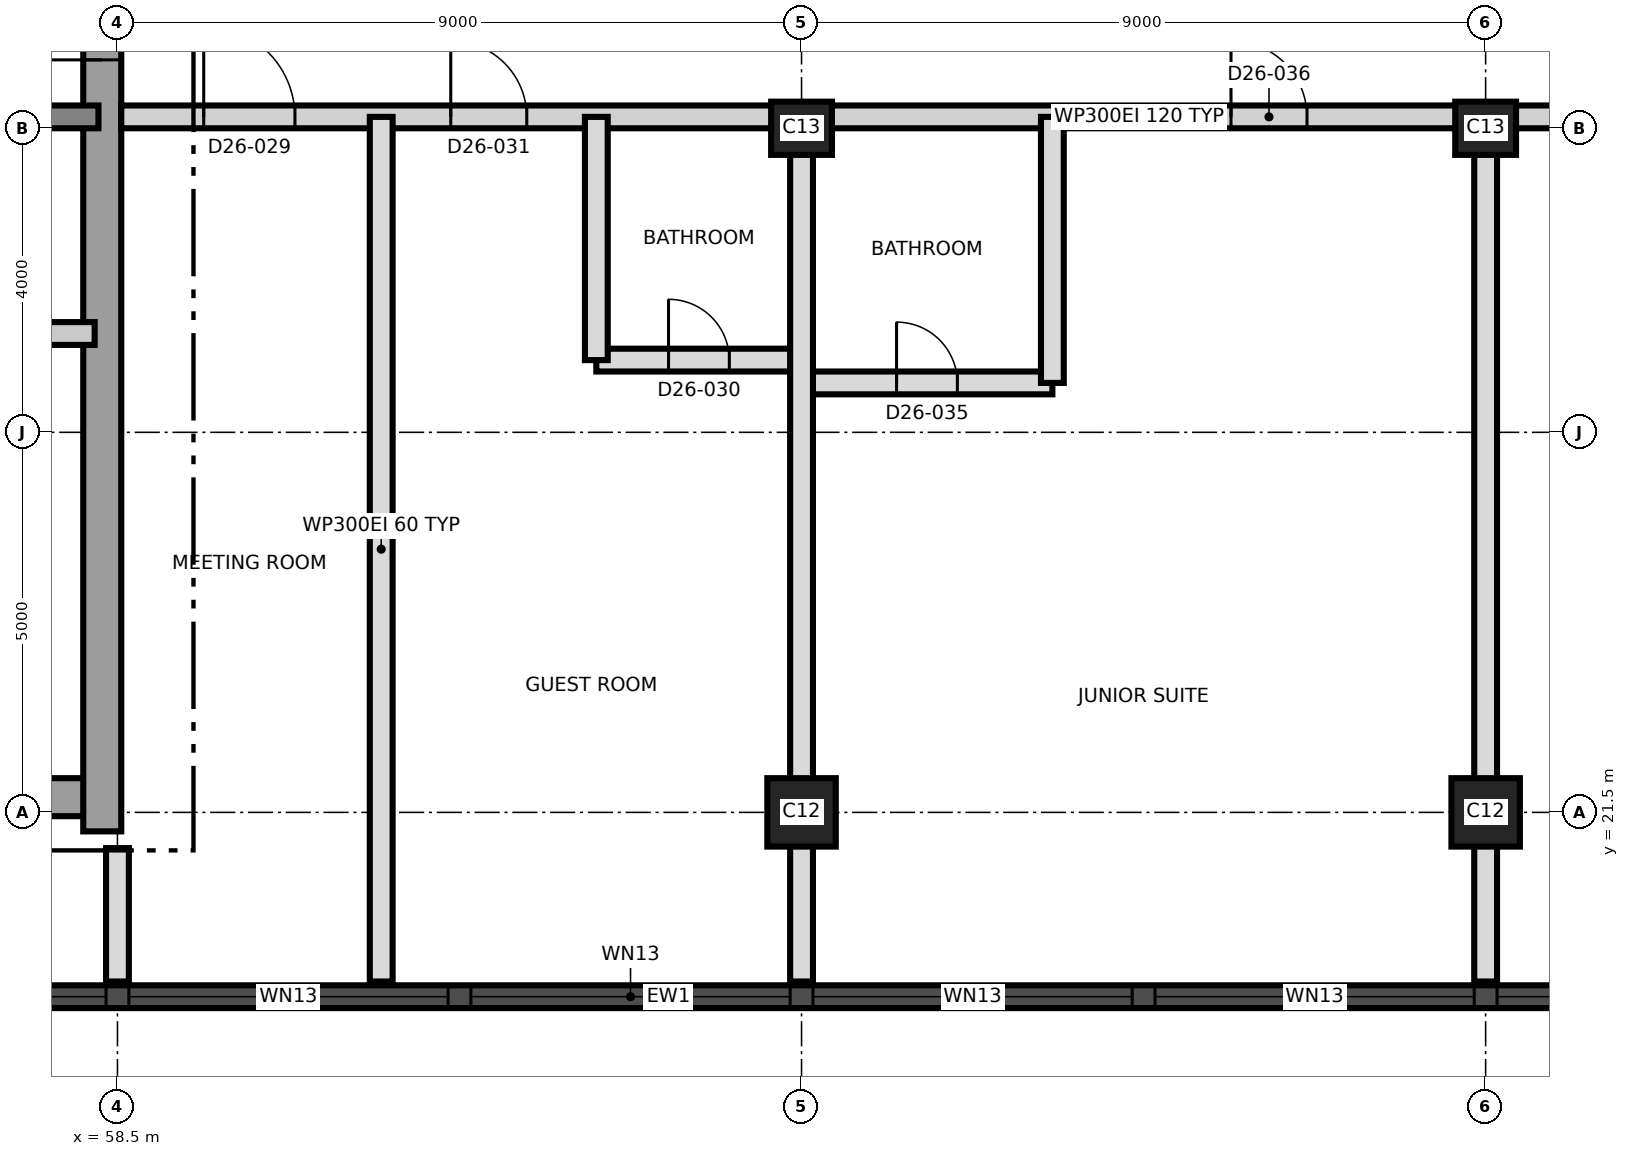
"""IFC4 building model, lengths in metres.
Left out: names, types, materials, properties, quantities, classifications, styles, units other than length and angle.
Written with IfcOpenShell. Run it as: python <this file> out.ifc"""

import sys

from ifc_helpers import new_model, si_unit, direction, frame, frame_2d, origin, origin_2d, place, context, subcontext, project, spatial, rectangle, extrude, element, fill, save


model = new_model("IFC4")
c1 = context("Model", 3, precision=1e-05, world=origin(), true_north=direction((0.0, 1.0)))
c2 = subcontext(c1, "Body", "Model", "MODEL_VIEW")
j1 = project(units=[si_unit("LENGTHUNIT", "METRE"), si_unit("PLANEANGLEUNIT", "RADIAN")], contexts=[c1])
p1 = place(None, origin())
s1 = spatial("IfcSite", under=j1, at=p1, CompositionType="ELEMENT")
p2 = place(p1, origin())
s2 = spatial("IfcBuilding", under=s1, at=p2, CompositionType="ELEMENT")
p3 = place(p2, frame((0.0, 0.0, 240.2)))
s3 = spatial("IfcBuildingStorey", under=s2, at=p3, CompositionType="ELEMENT", Elevation=240.2)
p4 = place(p3, frame((31.25, 21.7, 0.0), z_axis=(0.0, 0.0, 1.0), x_axis=(1.0, 0.0, 0.0)))
e1 = element("IfcWall", 1, at=p4, inside=s3, PredefinedType="SHEAR", context=c2, shape_type="SweptSolid", body=[
    extrude(rectangle(XDim=27.0, YDim=0.5, at=frame_2d((13.5, 0.0))), origin(), (0.0, 0.0, 1.0), 3.7),
])
p5 = place(p3, frame((58.3, 21.25, 0.0), z_axis=(0.0, 0.0, 1.0), x_axis=(0.0, 1.0, 0.0)))
e2 = element("IfcWall", 2, at=p5, inside=s3, PredefinedType="SHEAR", context=c2, shape_type="SweptSolid", body=[
    extrude(rectangle(XDim=18.5, YDim=0.5, at=frame_2d((9.25, 0.0))), origin(), (0.0, 0.0, 1.0), 3.7),
])
p6 = place(p5, frame((10.15, 0.0, 0.0)))
e3 = element("IfcOpeningElement", 3, at=p6, cuts=e2, PredefinedType="OPENING", context=c2, shape_type="SweptSolid", body=[
    extrude(rectangle(XDim=1.2, YDim=2.1, at=frame_2d((0.6, 1.05))), frame((0.0, 0.26, 0.0), z_axis=(0.0, -1.0, 0.0), x_axis=(1.0, 0.0, 0.0)), (0.0, 0.0, 1.0), 0.52),
])
p7 = place(p3, frame((31.75, 30.65, 0.0), z_axis=(0.0, 0.0, 1.0), x_axis=(1.0, 0.0, 0.0)))
e4 = element("IfcWall", 4, at=p7, inside=s3, PredefinedType="SHEAR", context=c2, shape_type="SweptSolid", body=[
    extrude(rectangle(XDim=26.5, YDim=0.3, at=frame_2d((13.25, 0.0))), origin(), (0.0, 0.0, 1.0), 3.7),
])
p8 = place(p7, frame((24.75, 0.0, 0.0)))
e5 = element("IfcOpeningElement", 5, at=p8, cuts=e4, PredefinedType="OPENING", context=c2, shape_type="SweptSolid", body=[
    extrude(rectangle(XDim=1.0, YDim=2.1, at=frame_2d((0.5, 1.05))), frame((0.0, 0.16, 0.0), z_axis=(0.0, -1.0, 0.0), x_axis=(1.0, 0.0, 0.0)), (0.0, 0.0, 1.0), 0.32),
])
for number, where, z_axis, x_axis in (
    (6, (67.5, 21.5, 0.0), (0.0, 0.0, 1.0), (1.0, 0.0, 0.0)),
    (7, (76.5, 21.5, 0.0), (0.0, 0.0, 1.0), (1.0, 0.0, 0.0)),
):
    element("IfcColumn", number, at=place(p3, frame(where, z_axis=z_axis, x_axis=x_axis)), inside=s3, PredefinedType="COLUMN", context=c2, shape_type="SweptSolid", body=[
        extrude(rectangle(XDim=0.9, YDim=0.9, at=origin_2d()), origin(), (0.0, 0.0, 1.0), 3.7),
    ])
for number, where, z_axis, x_axis in (
    (8, (67.5, 30.5, 0.0), (0.0, 0.0, 1.0), (1.0, 0.0, 0.0)),
    (9, (76.5, 30.5, 0.0), (0.0, 0.0, 1.0), (1.0, 0.0, 0.0)),
):
    element("IfcColumn", number, at=place(p3, frame(where, z_axis=z_axis, x_axis=x_axis)), inside=s3, PredefinedType="COLUMN", context=c2, shape_type="SweptSolid", body=[
        extrude(rectangle(XDim=0.8, YDim=0.7, at=origin_2d()), origin(), (0.0, 0.0, 1.0), 3.7),
    ])
p9 = place(p3, frame((44.01, 19.075, 0.0), z_axis=(0.0, 0.0, 1.0), x_axis=(1.0, 0.0, 0.0)))
e10 = element("IfcWall", 10, at=p9, inside=s3, PredefinedType="SOLIDWALL", context=c2, shape_type="SweptSolid", body=[
    extrude(rectangle(XDim=43.478, YDim=0.3, at=frame_2d((21.739, 0.0))), origin(), (0.0, 0.0, 1.0), 3.4),
])
p10 = place(p9, frame((1.845, 0.0, 0.3)))
e11 = element("IfcOpeningElement", 11, at=p10, cuts=e10, PredefinedType="OPENING", context=c2, shape_type="SweptSolid", body=[
    extrude(rectangle(XDim=1.8, YDim=2.4, at=frame_2d((0.9, 1.2))), frame((0.0, 0.16, 0.0), z_axis=(0.0, -1.0, 0.0), x_axis=(1.0, 0.0, 0.0)), (0.0, 0.0, 1.0), 0.32),
])
p11 = place(p9, frame((5.64, 0.0, 0.9)))
e12 = element("IfcOpeningElement", 12, at=p11, cuts=e10, PredefinedType="OPENING", context=c2, shape_type="SweptSolid", body=[
    extrude(rectangle(XDim=4.2, YDim=1.7, at=frame_2d((2.1, 0.85))), frame((0.0, 0.16, 0.0), z_axis=(0.0, -1.0, 0.0), x_axis=(1.0, 0.0, 0.0)), (0.0, 0.0, 1.0), 0.32),
])
p12 = place(p9, frame((10.14, 0.0, 0.9)))
e13 = element("IfcOpeningElement", 13, at=p12, cuts=e10, PredefinedType="OPENING", context=c2, shape_type="SweptSolid", body=[
    extrude(rectangle(XDim=4.2, YDim=1.7, at=frame_2d((2.1, 0.85))), frame((0.0, 0.16, 0.0), z_axis=(0.0, -1.0, 0.0), x_axis=(1.0, 0.0, 0.0)), (0.0, 0.0, 1.0), 0.32),
])
p13 = place(p9, frame((14.64, 0.0, 0.9)))
e14 = element("IfcOpeningElement", 14, at=p13, cuts=e10, PredefinedType="OPENING", context=c2, shape_type="SweptSolid", body=[
    extrude(rectangle(XDim=4.2, YDim=1.7, at=frame_2d((2.1, 0.85))), frame((0.0, 0.16, 0.0), z_axis=(0.0, -1.0, 0.0), x_axis=(1.0, 0.0, 0.0)), (0.0, 0.0, 1.0), 0.32),
])
p14 = place(p9, frame((19.14, 0.0, 0.9)))
e15 = element("IfcOpeningElement", 15, at=p14, cuts=e10, PredefinedType="OPENING", context=c2, shape_type="SweptSolid", body=[
    extrude(rectangle(XDim=4.2, YDim=1.7, at=frame_2d((2.1, 0.85))), frame((0.0, 0.16, 0.0), z_axis=(0.0, -1.0, 0.0), x_axis=(1.0, 0.0, 0.0)), (0.0, 0.0, 1.0), 0.32),
])
p15 = place(p9, frame((23.64, 0.0, 0.9)))
e16 = element("IfcOpeningElement", 16, at=p15, cuts=e10, PredefinedType="OPENING", context=c2, shape_type="SweptSolid", body=[
    extrude(rectangle(XDim=4.2, YDim=1.7, at=frame_2d((2.1, 0.85))), frame((0.0, 0.16, 0.0), z_axis=(0.0, -1.0, 0.0), x_axis=(1.0, 0.0, 0.0)), (0.0, 0.0, 1.0), 0.32),
])
p16 = place(p9, frame((28.14, 0.0, 0.9)))
e17 = element("IfcOpeningElement", 17, at=p16, cuts=e10, PredefinedType="OPENING", context=c2, shape_type="SweptSolid", body=[
    extrude(rectangle(XDim=4.2, YDim=1.7, at=frame_2d((2.1, 0.85))), frame((0.0, 0.16, 0.0), z_axis=(0.0, -1.0, 0.0), x_axis=(1.0, 0.0, 0.0)), (0.0, 0.0, 1.0), 0.32),
])
p17 = place(p9, frame((32.64, 0.0, 0.9)))
e18 = element("IfcOpeningElement", 18, at=p17, cuts=e10, PredefinedType="OPENING", context=c2, shape_type="SweptSolid", body=[
    extrude(rectangle(XDim=4.2, YDim=1.7, at=frame_2d((2.1, 0.85))), frame((0.0, 0.16, 0.0), z_axis=(0.0, -1.0, 0.0), x_axis=(1.0, 0.0, 0.0)), (0.0, 0.0, 1.0), 0.32),
])
p18 = place(p9, frame((37.14, 0.0, 0.9)))
e19 = element("IfcOpeningElement", 19, at=p18, cuts=e10, PredefinedType="OPENING", context=c2, shape_type="SweptSolid", body=[
    extrude(rectangle(XDim=4.2, YDim=1.7, at=frame_2d((2.1, 0.85))), frame((0.0, 0.16, 0.0), z_axis=(0.0, -1.0, 0.0), x_axis=(1.0, 0.0, 0.0)), (0.0, 0.0, 1.0), 0.32),
])
p19 = place(p3, frame((55.8, 27.8, 0.0), z_axis=(0.0, 0.0, 1.0), x_axis=(1.0, 0.0, 0.0)))
e20 = element("IfcWall", 20, at=p19, inside=s3, PredefinedType="PARTITIONING", context=c2, shape_type="SweptSolid", body=[
    extrude(rectangle(XDim=2.4, YDim=0.3, at=frame_2d((1.2, 0.0))), origin(), (0.0, 0.0, 1.0), 3.4),
])
p20 = place(p19, frame((0.75, 0.0, 0.0)))
e21 = element("IfcOpeningElement", 21, at=p20, cuts=e20, PredefinedType="OPENING", context=c2, shape_type="SweptSolid", body=[
    extrude(rectangle(XDim=0.9, YDim=2.1, at=frame_2d((0.45, 1.05))), frame((0.0, 0.16, 0.0), z_axis=(0.0, -1.0, 0.0), x_axis=(1.0, 0.0, 0.0)), (0.0, 0.0, 1.0), 0.32),
])
p21 = place(p3, frame((67.5, 27.15, 0.0), z_axis=(0.0, 0.0, 1.0), x_axis=(1.0, 0.0, 0.0)))
e22 = element("IfcWall", 22, at=p21, inside=s3, PredefinedType="PARTITIONING", context=c2, shape_type="SweptSolid", body=[
    extrude(rectangle(XDim=3.3, YDim=0.3, at=frame_2d((1.65, 0.0))), origin(), (0.0, 0.0, 1.0), 3.4),
])
p22 = place(p21, frame((1.25, 0.0, 0.0)))
e23 = element("IfcOpeningElement", 23, at=p22, cuts=e22, PredefinedType="OPENING", context=c2, shape_type="SweptSolid", body=[
    extrude(rectangle(XDim=0.8, YDim=2.1, at=frame_2d((0.4, 1.05))), frame((0.0, 0.16, 0.0), z_axis=(0.0, -1.0, 0.0), x_axis=(1.0, 0.0, 0.0)), (0.0, 0.0, 1.0), 0.32),
])
p23 = place(p3, frame((64.8, 27.45, 0.0), z_axis=(0.0, 0.0, 1.0), x_axis=(1.0, 0.0, 0.0)))
e24 = element("IfcWall", 24, at=p23, inside=s3, PredefinedType="PARTITIONING", context=c2, shape_type="SweptSolid", body=[
    extrude(rectangle(XDim=2.7, YDim=0.3, at=frame_2d((1.35, 0.0))), origin(), (0.0, 0.0, 1.0), 3.4),
])
p24 = place(p23, frame((0.95, 0.0, 0.0)))
e25 = element("IfcOpeningElement", 25, at=p24, cuts=e24, PredefinedType="OPENING", context=c2, shape_type="SweptSolid", body=[
    extrude(rectangle(XDim=0.8, YDim=2.1, at=frame_2d((0.4, 1.05))), frame((0.0, 0.16, 0.0), z_axis=(0.0, -1.0, 0.0), x_axis=(1.0, 0.0, 0.0)), (0.0, 0.0, 1.0), 0.32),
])
p25 = place(p3, frame((58.55, 30.65, 0.0), z_axis=(0.0, 0.0, 1.0), x_axis=(1.0, 0.0, 0.0)))
e26 = element("IfcWall", 26, at=p25, inside=s3, PredefinedType="PARTITIONING", context=c2, shape_type="SweptSolid", body=[
    extrude(rectangle(XDim=26.78, YDim=0.3, at=frame_2d((13.39, 0.0))), origin(), (0.0, 0.0, 1.0), 3.4),
])
p26 = place(p25, frame((1.085, 0.0, 0.0)))
e27 = element("IfcOpeningElement", 27, at=p26, cuts=e26, PredefinedType="OPENING", context=c2, shape_type="SweptSolid", body=[
    extrude(rectangle(XDim=1.2, YDim=2.1, at=frame_2d((0.6, 1.05))), frame((0.0, 0.16, 0.0), z_axis=(0.0, -1.0, 0.0), x_axis=(1.0, 0.0, 0.0)), (0.0, 0.0, 1.0), 0.32),
])
p27 = place(p25, frame((4.335, 0.0, 0.0)))
e28 = element("IfcOpeningElement", 28, at=p27, cuts=e26, PredefinedType="OPENING", context=c2, shape_type="SweptSolid", body=[
    extrude(rectangle(XDim=1.0, YDim=2.1, at=frame_2d((0.5, 1.05))), frame((0.0, 0.16, 0.0), z_axis=(0.0, -1.0, 0.0), x_axis=(1.0, 0.0, 0.0)), (0.0, 0.0, 1.0), 0.32),
])
p28 = place(p25, frame((14.6, 0.0, 0.0)))
e29 = element("IfcOpeningElement", 29, at=p28, cuts=e26, PredefinedType="OPENING", context=c2, shape_type="SweptSolid", body=[
    extrude(rectangle(XDim=1.0, YDim=2.4, at=frame_2d((0.5, 1.2))), frame((0.0, 0.16, 0.0), z_axis=(0.0, -1.0, 0.0), x_axis=(1.0, 0.0, 0.0)), (0.0, 0.0, 1.0), 0.32),
])
p29 = place(p25, frame((20.3, 0.0, 0.0)))
e30 = element("IfcOpeningElement", 30, at=p29, cuts=e26, PredefinedType="OPENING", context=c2, shape_type="SweptSolid", body=[
    extrude(rectangle(XDim=1.0, YDim=2.4, at=frame_2d((0.5, 1.2))), frame((0.0, 0.16, 0.0), z_axis=(0.0, -1.0, 0.0), x_axis=(1.0, 0.0, 0.0)), (0.0, 0.0, 1.0), 0.32),
])
p30 = place(p3, frame((58.5, 19.275, 0.0), z_axis=(0.0, 0.0, 1.0), x_axis=(0.0, 1.0, 0.0)))
e31 = element("IfcWall", 31, at=p30, inside=s3, PredefinedType="PARTITIONING", context=c2, shape_type="SweptSolid", body=[
    extrude(rectangle(XDim=1.755, YDim=0.3, at=frame_2d((0.877, 0.0))), origin(), (0.0, 0.0, 1.0), 3.35),
])
p31 = place(p3, frame((61.97, 19.275, 0.0), z_axis=(0.0, 0.0, 1.0), x_axis=(0.0, 1.0, 0.0)))
e32 = element("IfcWall", 32, at=p31, inside=s3, PredefinedType="PARTITIONING", context=c2, shape_type="SweptSolid", body=[
    extrude(rectangle(XDim=11.375, YDim=0.3, at=frame_2d((5.688, 0.0))), origin(), (0.0, 0.0, 1.0), 3.35),
])
p32 = place(p3, frame((64.8, 27.45, 0.0), z_axis=(0.0, 0.0, 1.0), x_axis=(0.0, 1.0, 0.0)))
e33 = element("IfcWall", 33, at=p32, inside=s3, PredefinedType="PARTITIONING", context=c2, shape_type="SweptSolid", body=[
    extrude(rectangle(XDim=3.2, YDim=0.3, at=frame_2d((1.6, 0.0))), origin(), (0.0, 0.0, 1.0), 3.4),
])
p33 = place(p3, frame((67.5, 19.275, 0.0), z_axis=(0.0, 0.0, 1.0), x_axis=(0.0, 1.0, 0.0)))
e34 = element("IfcWall", 34, at=p33, inside=s3, PredefinedType="PARTITIONING", context=c2, shape_type="SweptSolid", body=[
    extrude(rectangle(XDim=11.375, YDim=0.3, at=frame_2d((5.688, 0.0))), origin(), (0.0, 0.0, 1.0), 3.35),
])
p34 = place(p3, frame((70.8, 27.15, 0.0), z_axis=(0.0, 0.0, 1.0), x_axis=(0.0, 1.0, 0.0)))
e35 = element("IfcWall", 35, at=p34, inside=s3, PredefinedType="PARTITIONING", context=c2, shape_type="SweptSolid", body=[
    extrude(rectangle(XDim=3.5, YDim=0.3, at=frame_2d((1.75, 0.0))), origin(), (0.0, 0.0, 1.0), 3.4),
])
p35 = place(p3, frame((76.5, 19.275, 0.0), z_axis=(0.0, 0.0, 1.0), x_axis=(0.0, 1.0, 0.0)))
e36 = element("IfcWall", 36, at=p35, inside=s3, PredefinedType="PARTITIONING", context=c2, shape_type="SweptSolid", body=[
    extrude(rectangle(XDim=11.375, YDim=0.3, at=frame_2d((5.688, 0.0))), origin(), (0.0, 0.0, 1.0), 3.35),
])
p36 = place(p12, origin())
e37 = element("IfcWindow", 37, at=p36, inside=s3, PartitioningType="SINGLE_PANEL", PredefinedType="WINDOW", context=c2, shape_type="SweptSolid", body=[
    extrude(rectangle(XDim=4.2, YDim=1.7, at=frame_2d((2.1, 0.85))), frame((0.0, 0.03, 0.0), z_axis=(0.0, -1.0, 0.0), x_axis=(1.0, 0.0, 0.0)), (0.0, 0.0, 1.0), 0.06),
])
fill(e13, e37)
p37 = place(p13, origin())
e38 = element("IfcWindow", 38, at=p37, inside=s3, PartitioningType="SINGLE_PANEL", PredefinedType="WINDOW", context=c2, shape_type="SweptSolid", body=[
    extrude(rectangle(XDim=4.2, YDim=1.7, at=frame_2d((2.1, 0.85))), frame((0.0, 0.03, 0.0), z_axis=(0.0, -1.0, 0.0), x_axis=(1.0, 0.0, 0.0)), (0.0, 0.0, 1.0), 0.06),
])
fill(e14, e38)
p38 = place(p14, origin())
e39 = element("IfcWindow", 39, at=p38, inside=s3, PartitioningType="SINGLE_PANEL", PredefinedType="WINDOW", context=c2, shape_type="SweptSolid", body=[
    extrude(rectangle(XDim=4.2, YDim=1.7, at=frame_2d((2.1, 0.85))), frame((0.0, 0.03, 0.0), z_axis=(0.0, -1.0, 0.0), x_axis=(1.0, 0.0, 0.0)), (0.0, 0.0, 1.0), 0.06),
])
fill(e15, e39)
p39 = place(p15, origin())
e40 = element("IfcWindow", 40, at=p39, inside=s3, PartitioningType="SINGLE_PANEL", PredefinedType="WINDOW", context=c2, shape_type="SweptSolid", body=[
    extrude(rectangle(XDim=4.2, YDim=1.7, at=frame_2d((2.1, 0.85))), frame((0.0, 0.03, 0.0), z_axis=(0.0, -1.0, 0.0), x_axis=(1.0, 0.0, 0.0)), (0.0, 0.0, 1.0), 0.06),
])
fill(e16, e40)
p40 = place(p16, origin())
e41 = element("IfcWindow", 41, at=p40, inside=s3, PartitioningType="SINGLE_PANEL", PredefinedType="WINDOW", context=c2, shape_type="SweptSolid", body=[
    extrude(rectangle(XDim=4.2, YDim=1.7, at=frame_2d((2.1, 0.85))), frame((0.0, 0.03, 0.0), z_axis=(0.0, -1.0, 0.0), x_axis=(1.0, 0.0, 0.0)), (0.0, 0.0, 1.0), 0.06),
])
fill(e17, e41)
p41 = place(p17, origin())
e42 = element("IfcWindow", 42, at=p41, inside=s3, PartitioningType="SINGLE_PANEL", PredefinedType="WINDOW", context=c2, shape_type="SweptSolid", body=[
    extrude(rectangle(XDim=4.2, YDim=1.7, at=frame_2d((2.1, 0.85))), frame((0.0, 0.03, 0.0), z_axis=(0.0, -1.0, 0.0), x_axis=(1.0, 0.0, 0.0)), (0.0, 0.0, 1.0), 0.06),
])
fill(e18, e42)
p42 = place(p6, origin())
e43 = element("IfcDoor", 43, at=p42, inside=s3, OperationType="SINGLE_SWING_LEFT", PredefinedType="DOOR", context=c2, shape_type="SweptSolid", body=[
    extrude(rectangle(XDim=1.2, YDim=2.1, at=frame_2d((0.6, 1.05))), frame((0.0, 0.025, 0.0), z_axis=(0.0, -1.0, 0.0), x_axis=(1.0, 0.0, 0.0)), (0.0, 0.0, 1.0), 0.05),
])
fill(e3, e43)
p43 = place(p26, origin())
e44 = element("IfcDoor", 44, at=p43, inside=s3, OperationType="SINGLE_SWING_LEFT", PredefinedType="DOOR", context=c2, shape_type="SweptSolid", body=[
    extrude(rectangle(XDim=1.2, YDim=2.1, at=frame_2d((0.6, 1.05))), frame((0.0, 0.025, 0.0), z_axis=(0.0, -1.0, 0.0), x_axis=(1.0, 0.0, 0.0)), (0.0, 0.0, 1.0), 0.05),
])
fill(e27, e44)
p44 = place(p24, origin())
e45 = element("IfcDoor", 45, at=p44, inside=s3, OperationType="SINGLE_SWING_RIGHT", PredefinedType="DOOR", context=c2, shape_type="SweptSolid", body=[
    extrude(rectangle(XDim=0.8, YDim=2.1, at=frame_2d((0.4, 1.05))), frame((0.0, 0.025, 0.0), z_axis=(0.0, -1.0, 0.0), x_axis=(1.0, 0.0, 0.0)), (0.0, 0.0, 1.0), 0.05),
])
fill(e25, e45)
p45 = place(p27, origin())
e46 = element("IfcDoor", 46, at=p45, inside=s3, OperationType="SINGLE_SWING_LEFT", PredefinedType="DOOR", context=c2, shape_type="SweptSolid", body=[
    extrude(rectangle(XDim=1.0, YDim=2.1, at=frame_2d((0.5, 1.05))), frame((0.0, 0.025, 0.0), z_axis=(0.0, -1.0, 0.0), x_axis=(1.0, 0.0, 0.0)), (0.0, 0.0, 1.0), 0.05),
])
fill(e28, e46)
p46 = place(p22, origin())
e47 = element("IfcDoor", 47, at=p46, inside=s3, OperationType="SINGLE_SWING_LEFT", PredefinedType="DOOR", context=c2, shape_type="SweptSolid", body=[
    extrude(rectangle(XDim=0.8, YDim=2.1, at=frame_2d((0.4, 1.05))), frame((0.0, 0.025, 0.0), z_axis=(0.0, -1.0, 0.0), x_axis=(1.0, 0.0, 0.0)), (0.0, 0.0, 1.0), 0.05),
])
fill(e23, e47)
p47 = place(p28, origin())
e48 = element("IfcDoor", 48, at=p47, inside=s3, OperationType="SINGLE_SWING_LEFT", PredefinedType="DOOR", context=c2, shape_type="SweptSolid", body=[
    extrude(rectangle(XDim=1.0, YDim=2.4, at=frame_2d((0.5, 1.2))), frame((0.0, 0.025, 0.0), z_axis=(0.0, -1.0, 0.0), x_axis=(1.0, 0.0, 0.0)), (0.0, 0.0, 1.0), 0.05),
])
fill(e29, e48)
save(model, sys.argv[1])
